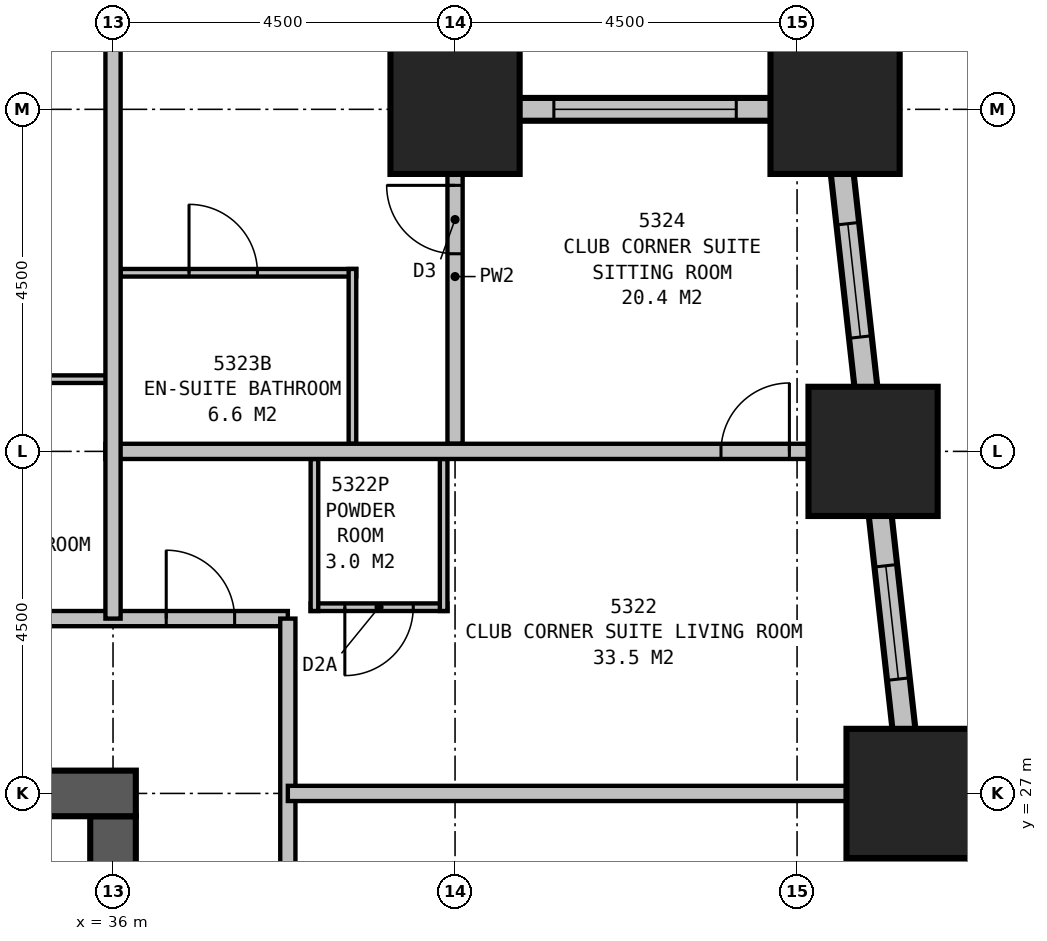
"""IFC4 building model, lengths in metres.
Left out: names, types, materials, properties, quantities, classifications, styles, units other than length and angle.
Written with IfcOpenShell. Run it as: python <this file> out.ifc"""

import sys

from ifc_helpers import new_model, si_unit, direction, frame, frame_2d, origin, origin_2d, place, context, subcontext, project, spatial, rectangle, extrude, element, fill, save


model = new_model("IFC4")
c1 = context("Model", 3, precision=1e-05, world=origin(), true_north=direction((0.0, 1.0)))
c2 = subcontext(c1, "Body", "Model", "MODEL_VIEW")
j1 = project(units=[si_unit("LENGTHUNIT", "METRE"), si_unit("PLANEANGLEUNIT", "RADIAN")], contexts=[c1])
p1 = place(None, origin())
s1 = spatial("IfcSite", under=j1, at=p1, CompositionType="ELEMENT")
p2 = place(p1, origin())
s2 = spatial("IfcBuilding", under=s1, at=p2, CompositionType="ELEMENT")
p3 = place(p2, frame((0.0, 0.0, 204.4)))
s3 = spatial("IfcBuildingStorey", under=s2, at=p3, CompositionType="ELEMENT", Elevation=204.4)
for number, where, z_axis, x_axis in (
    (1, (46.5, 27.0, 0.0), (0.0, 0.0, 1.0), (1.0, 0.0, 0.0)),
    (2, (46.0, 31.5, 0.0), (0.0, 0.0, 1.0), (1.0, 0.0, 0.0)),
    (3, (45.5, 36.0, 0.0), (0.0, 0.0, 1.0), (1.0, 0.0, 0.0)),
    (4, (40.5, 36.0, 0.0), (0.0, 0.0, 1.0), (1.0, 0.0, 0.0)),
):
    element("IfcColumn", number, at=place(p3, frame(where, z_axis=z_axis, x_axis=x_axis)), inside=s3, PredefinedType="COLUMN", context=c2, shape_type="SweptSolid", body=[
        extrude(rectangle(XDim=1.7, YDim=1.7, at=origin_2d()), origin(), (0.0, 0.0, 1.0), 3.5),
    ])
p4 = place(p3, frame((36.3, 27.0, 0.0), z_axis=(0.0, 0.0, 1.0), x_axis=(-1.0, 0.0, 0.0)))
e5 = element("IfcWall", 5, at=p4, inside=s3, PredefinedType="SHEAR", context=c2, shape_type="SweptSolid", body=[
    extrude(rectangle(XDim=23.1, YDim=0.6, at=frame_2d((11.55, 0.0))), origin(), (0.0, 0.0, 1.0), 3.5),
])
p5 = place(p4, frame((17.05, 0.0, 0.0)))
e6 = element("IfcOpeningElement", 6, at=p5, cuts=e5, PredefinedType="OPENING", context=c2, shape_type="SweptSolid", body=[
    extrude(rectangle(XDim=1.0, YDim=2.1, at=frame_2d((0.5, 1.05))), frame((0.0, 0.31, 0.0), z_axis=(0.0, -1.0, 0.0), x_axis=(1.0, 0.0, 0.0)), (0.0, 0.0, 1.0), 0.62),
])
p6 = place(p4, frame((12.05, 0.0, 0.0)))
e7 = element("IfcOpeningElement", 7, at=p6, cuts=e5, PredefinedType="OPENING", context=c2, shape_type="SweptSolid", body=[
    extrude(rectangle(XDim=1.0, YDim=2.1, at=frame_2d((0.5, 1.05))), frame((0.0, 0.31, 0.0), z_axis=(0.0, -1.0, 0.0), x_axis=(1.0, 0.0, 0.0)), (0.0, 0.0, 1.0), 0.62),
])
p7 = place(p4, frame((7.05, 0.0, 0.0)))
e8 = element("IfcOpeningElement", 8, at=p7, cuts=e5, PredefinedType="OPENING", context=c2, shape_type="SweptSolid", body=[
    extrude(rectangle(XDim=1.0, YDim=2.1, at=frame_2d((0.5, 1.05))), frame((0.0, 0.31, 0.0), z_axis=(0.0, -1.0, 0.0), x_axis=(1.0, 0.0, 0.0)), (0.0, 0.0, 1.0), 0.62),
])
p8 = place(p3, frame((36.0, 20.0, 0.0), z_axis=(0.0, 0.0, 1.0), x_axis=(0.0, 1.0, 0.0)))
e9 = element("IfcWall", 9, at=p8, inside=s3, PredefinedType="SHEAR", context=c2, shape_type="SweptSolid", body=[
    extrude(rectangle(XDim=6.7, YDim=0.6, at=frame_2d((3.35, 0.0))), origin(), (0.0, 0.0, 1.0), 3.5),
])
p9 = place(p3, frame((49.017, 4.351, 0.0), z_axis=(0.0, 0.0, 1.0), x_axis=(-0.110433201132, 0.993883548555, 0.0)))
e10 = element("IfcWall", 10, at=p9, inside=s3, PredefinedType="STANDARD", context=c2, shape_type="SweptSolid", body=[
    extrude(rectangle(XDim=31.994, YDim=0.3, at=frame_2d((15.997, 0.0))), origin(), (0.0, 0.0, 1.0), 2.25),
])
p10 = place(p9, frame((1.664, 0.0, 0.5)))
e11 = element("IfcOpeningElement", 11, at=p10, cuts=e10, PredefinedType="OPENING", context=c2, shape_type="SweptSolid", body=[
    extrude(rectangle(XDim=1.5, YDim=1.6, at=frame_2d((0.75, 0.8))), frame((0.0, 0.16, 0.0), z_axis=(0.0, -1.0, 0.0), x_axis=(1.0, 0.0, 0.0)), (0.0, 0.0, 1.0), 0.32),
])
p11 = place(p9, frame((6.192, 0.0, 0.5)))
e12 = element("IfcOpeningElement", 12, at=p11, cuts=e10, PredefinedType="OPENING", context=c2, shape_type="SweptSolid", body=[
    extrude(rectangle(XDim=1.5, YDim=1.6, at=frame_2d((0.75, 0.8))), frame((0.0, 0.16, 0.0), z_axis=(0.0, -1.0, 0.0), x_axis=(1.0, 0.0, 0.0)), (0.0, 0.0, 1.0), 0.32),
])
p12 = place(p9, frame((10.719, 0.0, 0.5)))
e13 = element("IfcOpeningElement", 13, at=p12, cuts=e10, PredefinedType="OPENING", context=c2, shape_type="SweptSolid", body=[
    extrude(rectangle(XDim=1.5, YDim=1.6, at=frame_2d((0.75, 0.8))), frame((0.0, 0.16, 0.0), z_axis=(0.0, -1.0, 0.0), x_axis=(1.0, 0.0, 0.0)), (0.0, 0.0, 1.0), 0.32),
])
p13 = place(p9, frame((15.247, 0.0, 0.5)))
e14 = element("IfcOpeningElement", 14, at=p13, cuts=e10, PredefinedType="OPENING", context=c2, shape_type="SweptSolid", body=[
    extrude(rectangle(XDim=1.5, YDim=1.6, at=frame_2d((0.75, 0.8))), frame((0.0, 0.16, 0.0), z_axis=(0.0, -1.0, 0.0), x_axis=(1.0, 0.0, 0.0)), (0.0, 0.0, 1.0), 0.32),
])
p14 = place(p9, frame((19.775, 0.0, 0.5)))
e15 = element("IfcOpeningElement", 15, at=p14, cuts=e10, PredefinedType="OPENING", context=c2, shape_type="SweptSolid", body=[
    extrude(rectangle(XDim=1.5, YDim=1.6, at=frame_2d((0.75, 0.8))), frame((0.0, 0.16, 0.0), z_axis=(0.0, -1.0, 0.0), x_axis=(1.0, 0.0, 0.0)), (0.0, 0.0, 1.0), 0.32),
])
p15 = place(p9, frame((24.302, 0.0, 0.5)))
e16 = element("IfcOpeningElement", 16, at=p15, cuts=e10, PredefinedType="OPENING", context=c2, shape_type="SweptSolid", body=[
    extrude(rectangle(XDim=1.5, YDim=1.6, at=frame_2d((0.75, 0.8))), frame((0.0, 0.16, 0.0), z_axis=(0.0, -1.0, 0.0), x_axis=(1.0, 0.0, 0.0)), (0.0, 0.0, 1.0), 0.32),
])
p16 = place(p9, frame((28.83, 0.0, 0.5)))
e17 = element("IfcOpeningElement", 17, at=p16, cuts=e10, PredefinedType="OPENING", context=c2, shape_type="SweptSolid", body=[
    extrude(rectangle(XDim=1.5, YDim=1.6, at=frame_2d((0.75, 0.8))), frame((0.0, 0.16, 0.0), z_axis=(0.0, -1.0, 0.0), x_axis=(1.0, 0.0, 0.0)), (0.0, 0.0, 1.0), 0.32),
])
p17 = place(p3, frame((45.65, 36.0, 0.0), z_axis=(0.0, 0.0, 1.0), x_axis=(-1.0, 0.0, 0.0)))
e18 = element("IfcWall", 18, at=p17, inside=s3, PredefinedType="STANDARD", context=c2, shape_type="SweptSolid", body=[
    extrude(rectangle(XDim=5.3, YDim=0.3, at=frame_2d((2.65, 0.0))), origin(), (0.0, 0.0, 1.0), 2.25),
])
p18 = place(p17, frame((1.45, 0.0, 0.5)))
e19 = element("IfcOpeningElement", 19, at=p18, cuts=e18, PredefinedType="OPENING", context=c2, shape_type="SweptSolid", body=[
    extrude(rectangle(XDim=2.4, YDim=1.6, at=frame_2d((1.2, 0.8))), frame((0.0, 0.16, 0.0), z_axis=(0.0, -1.0, 0.0), x_axis=(1.0, 0.0, 0.0)), (0.0, 0.0, 1.0), 0.32),
])
p19 = place(p3, frame((40.5, 35.85, 0.0), z_axis=(0.0, 0.0, 1.0), x_axis=(0.0, 1.0, 0.0)))
e20 = element("IfcWall", 20, at=p19, inside=s3, PredefinedType="STANDARD", context=c2, shape_type="SweptSolid", body=[
    extrude(rectangle(XDim=4.8, YDim=0.3, at=frame_2d((2.4, 0.0))), origin(), (0.0, 0.0, 1.0), 2.25),
])
p20 = place(p19, frame((1.2, 0.0, 0.5)))
e21 = element("IfcOpeningElement", 21, at=p20, cuts=e20, PredefinedType="OPENING", context=c2, shape_type="SweptSolid", body=[
    extrude(rectangle(XDim=2.4, YDim=1.6, at=frame_2d((1.2, 0.8))), frame((0.0, 0.16, 0.0), z_axis=(0.0, -1.0, 0.0), x_axis=(1.0, 0.0, 0.0)), (0.0, 0.0, 1.0), 0.32),
])
p21 = place(p3, frame((11.2, 29.3, 0.0), z_axis=(0.0, 0.0, 1.0), x_axis=(1.0, 0.0, 0.0)))
e22 = element("IfcWall", 22, at=p21, inside=s3, PredefinedType="PARTITIONING", context=c2, shape_type="SweptSolid", body=[
    extrude(rectangle(XDim=27.1, YDim=0.2, at=frame_2d((13.55, 0.0))), origin(), (0.0, 0.0, 1.0), 3.25),
])
p22 = place(p21, frame((3.15, 0.0, 0.0)))
e23 = element("IfcOpeningElement", 23, at=p22, cuts=e22, PredefinedType="OPENING", context=c2, shape_type="SweptSolid", body=[
    extrude(rectangle(XDim=0.9, YDim=2.1, at=frame_2d((0.45, 1.05))), frame((0.0, 0.11, 0.0), z_axis=(0.0, -1.0, 0.0), x_axis=(1.0, 0.0, 0.0)), (0.0, 0.0, 1.0), 0.22),
])
p23 = place(p21, frame((16.65, 0.0, 0.0)))
e24 = element("IfcOpeningElement", 24, at=p23, cuts=e22, PredefinedType="OPENING", context=c2, shape_type="SweptSolid", body=[
    extrude(rectangle(XDim=0.9, YDim=2.1, at=frame_2d((0.45, 1.05))), frame((0.0, 0.11, 0.0), z_axis=(0.0, -1.0, 0.0), x_axis=(1.0, 0.0, 0.0)), (0.0, 0.0, 1.0), 0.22),
])
p24 = place(p21, frame((25.5, 0.0, 0.0)))
e25 = element("IfcOpeningElement", 25, at=p24, cuts=e22, PredefinedType="OPENING", context=c2, shape_type="SweptSolid", body=[
    extrude(rectangle(XDim=0.9, YDim=2.1, at=frame_2d((0.45, 1.05))), frame((0.0, 0.11, 0.0), z_axis=(0.0, -1.0, 0.0), x_axis=(1.0, 0.0, 0.0)), (0.0, 0.0, 1.0), 0.22),
])
p25 = place(p21, frame((0.7, 0.0, 0.0)))
e26 = element("IfcOpeningElement", 26, at=p25, cuts=e22, PredefinedType="OPENING", context=c2, shape_type="SweptSolid", body=[
    extrude(rectangle(XDim=0.9, YDim=2.1, at=frame_2d((0.45, 1.05))), frame((0.0, 0.11, 0.0), z_axis=(0.0, -1.0, 0.0), x_axis=(1.0, 0.0, 0.0)), (0.0, 0.0, 1.0), 0.22),
])
p26 = place(p3, frame((38.3, 10.6, 0.0), z_axis=(0.0, 0.0, 1.0), x_axis=(0.0, 1.0, 0.0)))
e27 = element("IfcWall", 27, at=p26, inside=s3, PredefinedType="PARTITIONING", context=c2, shape_type="SweptSolid", body=[
    extrude(rectangle(XDim=18.7, YDim=0.2, at=frame_2d((9.35, 0.0))), origin(), (0.0, 0.0, 1.0), 3.25),
])
p27 = place(p26, frame((6.95, 0.0, 0.0), z_axis=(0.0, 0.0, 1.0), x_axis=(-1.0, 0.0, 0.0)))
e28 = element("IfcOpeningElement", 28, at=p27, cuts=e27, PredefinedType="OPENING", context=c2, shape_type="SweptSolid", body=[
    extrude(rectangle(XDim=0.9, YDim=2.1, at=frame_2d((0.45, 1.05))), frame((0.0, 0.11, 0.0), z_axis=(0.0, -1.0, 0.0), x_axis=(1.0, 0.0, 0.0)), (0.0, 0.0, 1.0), 0.22),
])
p28 = place(p26, frame((10.9, 0.0, 0.0), z_axis=(0.0, 0.0, 1.0), x_axis=(-1.0, 0.0, 0.0)))
e29 = element("IfcOpeningElement", 29, at=p28, cuts=e27, PredefinedType="OPENING", context=c2, shape_type="SweptSolid", body=[
    extrude(rectangle(XDim=0.9, YDim=2.1, at=frame_2d((0.45, 1.05))), frame((0.0, 0.11, 0.0), z_axis=(0.0, -1.0, 0.0), x_axis=(1.0, 0.0, 0.0)), (0.0, 0.0, 1.0), 0.22),
])
p29 = place(p3, frame((32.85, 32.45, 0.0), z_axis=(0.0, 0.0, 1.0), x_axis=(1.0, 0.0, 0.0)))
e30 = element("IfcWall", 30, at=p29, inside=s3, PredefinedType="PLUMBINGWALL", context=c2, shape_type="SweptSolid", body=[
    extrude(rectangle(XDim=3.15, YDim=0.1, at=frame_2d((1.575, 0.0))), origin(), (0.0, 0.0, 1.0), 3.25),
])
p30 = place(p3, frame((38.3, 27.0, 0.0), z_axis=(0.0, 0.0, 1.0), x_axis=(1.0, 0.0, 0.0)))
e31 = element("IfcWall", 31, at=p30, inside=s3, PredefinedType="PARTITIONING", context=c2, shape_type="SweptSolid", body=[
    extrude(rectangle(XDim=7.977, YDim=0.2, at=frame_2d((3.988, 0.0))), origin(), (0.0, 0.0, 1.0), 1.95),
])
p31 = place(p3, frame((36.0, 29.3, 0.0), z_axis=(0.0, 0.0, 1.0), x_axis=(0.0, 1.0, 0.0)))
e32 = element("IfcWall", 32, at=p31, inside=s3, PredefinedType="PARTITIONING", context=c2, shape_type="SweptSolid", body=[
    extrude(rectangle(XDim=11.2, YDim=0.2, at=frame_2d((5.6, 0.0))), origin(), (0.0, 0.0, 1.0), 2.25),
])
p32 = place(p3, frame((35.9, 31.5, 0.0), z_axis=(0.0, 0.0, 1.0), x_axis=(1.0, 0.0, 0.0)))
e33 = element("IfcWall", 33, at=p32, inside=s3, PredefinedType="PARTITIONING", context=c2, shape_type="SweptSolid", body=[
    extrude(rectangle(XDim=10.099, YDim=0.2, at=frame_2d((5.05, 0.0))), origin(), (0.0, 0.0, 1.0), 3.25),
])
p33 = place(p32, frame((8.099, 0.0, 0.0)))
e34 = element("IfcOpeningElement", 34, at=p33, cuts=e33, PredefinedType="OPENING", context=c2, shape_type="SweptSolid", body=[
    extrude(rectangle(XDim=0.9, YDim=2.1, at=frame_2d((0.45, 1.05))), frame((0.0, 0.11, 0.0), z_axis=(0.0, -1.0, 0.0), x_axis=(1.0, 0.0, 0.0)), (0.0, 0.0, 1.0), 0.22),
])
p34 = place(p3, frame((40.35, 31.4, 0.0), z_axis=(0.0, 0.0, 1.0), x_axis=(0.0, -1.0, 0.0)))
e35 = element("IfcWall", 35, at=p34, inside=s3, PredefinedType="PLUMBINGWALL", context=c2, shape_type="SweptSolid", body=[
    extrude(rectangle(XDim=2.0, YDim=0.1, at=frame_2d((1.0, 0.0))), origin(), (0.0, 0.0, 1.0), 2.25),
])
p35 = place(p3, frame((38.65, 31.4, 0.0), z_axis=(0.0, 0.0, 1.0), x_axis=(0.0, -1.0, 0.0)))
e36 = element("IfcWall", 36, at=p35, inside=s3, PredefinedType="PLUMBINGWALL", context=c2, shape_type="SweptSolid", body=[
    extrude(rectangle(XDim=2.0, YDim=0.1, at=frame_2d((1.0, 0.0))), origin(), (0.0, 0.0, 1.0), 3.25),
])
p36 = place(p3, frame((38.6, 29.45, 0.0), z_axis=(0.0, 0.0, 1.0), x_axis=(1.0, 0.0, 0.0)))
e37 = element("IfcWall", 37, at=p36, inside=s3, PredefinedType="PLUMBINGWALL", context=c2, shape_type="SweptSolid", body=[
    extrude(rectangle(XDim=1.8, YDim=0.1, at=frame_2d((0.9, 0.0))), origin(), (0.0, 0.0, 1.0), 3.25),
])
p37 = place(p36, frame((1.35, 0.0, 0.0), z_axis=(0.0, 0.0, 1.0), x_axis=(-1.0, 0.0, 0.0)))
e38 = element("IfcOpeningElement", 38, at=p37, cuts=e37, PredefinedType="OPENING", context=c2, shape_type="SweptSolid", body=[
    extrude(rectangle(XDim=0.9, YDim=2.1, at=frame_2d((0.45, 1.05))), frame((0.0, 0.06, 0.0), z_axis=(0.0, -1.0, 0.0), x_axis=(1.0, 0.0, 0.0)), (0.0, 0.0, 1.0), 0.12),
])
p38 = place(p3, frame((40.5, 31.6, 0.0), z_axis=(0.0, 0.0, 1.0), x_axis=(0.0, 1.0, 0.0)))
e39 = element("IfcWall", 39, at=p38, inside=s3, PredefinedType="PARTITIONING", context=c2, shape_type="SweptSolid", body=[
    extrude(rectangle(XDim=4.4, YDim=0.2, at=frame_2d((2.2, 0.0))), origin(), (0.0, 0.0, 1.0), 2.25),
])
p39 = place(p38, frame((2.5, 0.0, 0.0)))
e40 = element("IfcOpeningElement", 40, at=p39, cuts=e39, PredefinedType="OPENING", context=c2, shape_type="SweptSolid", body=[
    extrude(rectangle(XDim=0.9, YDim=2.1, at=frame_2d((0.45, 1.05))), frame((0.0, 0.11, 0.0), z_axis=(0.0, -1.0, 0.0), x_axis=(1.0, 0.0, 0.0)), (0.0, 0.0, 1.0), 0.22),
])
p40 = place(p3, frame((39.15, 31.6, 0.0), z_axis=(0.0, 0.0, 1.0), x_axis=(0.0, 1.0, 0.0)))
e41 = element("IfcWall", 41, at=p40, inside=s3, PredefinedType="PLUMBINGWALL", context=c2, shape_type="SweptSolid", body=[
    extrude(rectangle(XDim=2.3, YDim=0.1, at=frame_2d((1.15, 0.0))), origin(), (0.0, 0.0, 1.0), 3.25),
])
p41 = place(p3, frame((36.1, 33.85, 0.0), z_axis=(0.0, 0.0, 1.0), x_axis=(1.0, 0.0, 0.0)))
e42 = element("IfcWall", 42, at=p41, inside=s3, PredefinedType="PLUMBINGWALL", context=c2, shape_type="SweptSolid", body=[
    extrude(rectangle(XDim=3.1, YDim=0.1, at=frame_2d((1.55, 0.0))), origin(), (0.0, 0.0, 1.0), 3.25),
])
p42 = place(p41, frame((0.9, 0.0, 0.0)))
e43 = element("IfcOpeningElement", 43, at=p42, cuts=e42, PredefinedType="OPENING", context=c2, shape_type="SweptSolid", body=[
    extrude(rectangle(XDim=0.9, YDim=2.1, at=frame_2d((0.45, 1.05))), frame((0.0, 0.06, 0.0), z_axis=(0.0, -1.0, 0.0), x_axis=(1.0, 0.0, 0.0)), (0.0, 0.0, 1.0), 0.12),
])
p43 = place(p15, origin())
e44 = element("IfcWindow", 44, at=p43, inside=s3, PartitioningType="SINGLE_PANEL", PredefinedType="WINDOW", context=c2, shape_type="SweptSolid", body=[
    extrude(rectangle(XDim=1.5, YDim=1.6, at=frame_2d((0.75, 0.8))), frame((0.0, 0.03, 0.0), z_axis=(0.0, -1.0, 0.0), x_axis=(1.0, 0.0, 0.0)), (0.0, 0.0, 1.0), 0.06),
])
fill(e16, e44)
p44 = place(p16, origin())
e45 = element("IfcWindow", 45, at=p44, inside=s3, PartitioningType="SINGLE_PANEL", PredefinedType="WINDOW", context=c2, shape_type="SweptSolid", body=[
    extrude(rectangle(XDim=1.5, YDim=1.6, at=frame_2d((0.75, 0.8))), frame((0.0, 0.03, 0.0), z_axis=(0.0, -1.0, 0.0), x_axis=(1.0, 0.0, 0.0)), (0.0, 0.0, 1.0), 0.06),
])
fill(e17, e45)
p45 = place(p18, origin())
e46 = element("IfcWindow", 46, at=p45, inside=s3, PartitioningType="SINGLE_PANEL", PredefinedType="WINDOW", context=c2, shape_type="SweptSolid", body=[
    extrude(rectangle(XDim=2.4, YDim=1.6, at=frame_2d((1.2, 0.8))), frame((0.0, 0.03, 0.0), z_axis=(0.0, -1.0, 0.0), x_axis=(1.0, 0.0, 0.0)), (0.0, 0.0, 1.0), 0.06),
])
fill(e19, e46)
p46 = place(p24, origin())
e47 = element("IfcDoor", 47, at=p46, inside=s3, OperationType="SINGLE_SWING_LEFT", PredefinedType="DOOR", context=c2, shape_type="SweptSolid", body=[
    extrude(rectangle(XDim=0.9, YDim=2.1, at=frame_2d((0.45, 1.05))), frame((0.0, 0.025, 0.0), z_axis=(0.0, -1.0, 0.0), x_axis=(1.0, 0.0, 0.0)), (0.0, 0.0, 1.0), 0.05),
])
fill(e25, e47)
p47 = place(p33, origin())
e48 = element("IfcDoor", 48, at=p47, inside=s3, OperationType="SINGLE_SWING_RIGHT", PredefinedType="DOOR", context=c2, shape_type="SweptSolid", body=[
    extrude(rectangle(XDim=0.9, YDim=2.1, at=frame_2d((0.45, 1.05))), frame((0.0, 0.025, 0.0), z_axis=(0.0, -1.0, 0.0), x_axis=(1.0, 0.0, 0.0)), (0.0, 0.0, 1.0), 0.05),
])
fill(e34, e48)
p48 = place(p37, origin())
e49 = element("IfcDoor", 49, at=p48, inside=s3, OperationType="SINGLE_SWING_RIGHT", PredefinedType="DOOR", context=c2, shape_type="SweptSolid", body=[
    extrude(rectangle(XDim=0.9, YDim=2.1, at=frame_2d((0.45, 1.05))), frame((0.0, 0.025, 0.0), z_axis=(0.0, -1.0, 0.0), x_axis=(1.0, 0.0, 0.0)), (0.0, 0.0, 1.0), 0.05),
])
fill(e38, e49)
p49 = place(p39, origin())
e50 = element("IfcDoor", 50, at=p49, inside=s3, OperationType="SINGLE_SWING_RIGHT", PredefinedType="DOOR", context=c2, shape_type="SweptSolid", body=[
    extrude(rectangle(XDim=0.9, YDim=2.1, at=frame_2d((0.45, 1.05))), frame((0.0, 0.025, 0.0), z_axis=(0.0, -1.0, 0.0), x_axis=(1.0, 0.0, 0.0)), (0.0, 0.0, 1.0), 0.05),
])
fill(e40, e50)
p50 = place(p42, origin())
e51 = element("IfcDoor", 51, at=p50, inside=s3, OperationType="SINGLE_SWING_LEFT", PredefinedType="DOOR", context=c2, shape_type="SweptSolid", body=[
    extrude(rectangle(XDim=0.9, YDim=2.1, at=frame_2d((0.45, 1.05))), frame((0.0, 0.025, 0.0), z_axis=(0.0, -1.0, 0.0), x_axis=(1.0, 0.0, 0.0)), (0.0, 0.0, 1.0), 0.05),
])
fill(e43, e51)
save(model, sys.argv[1])
